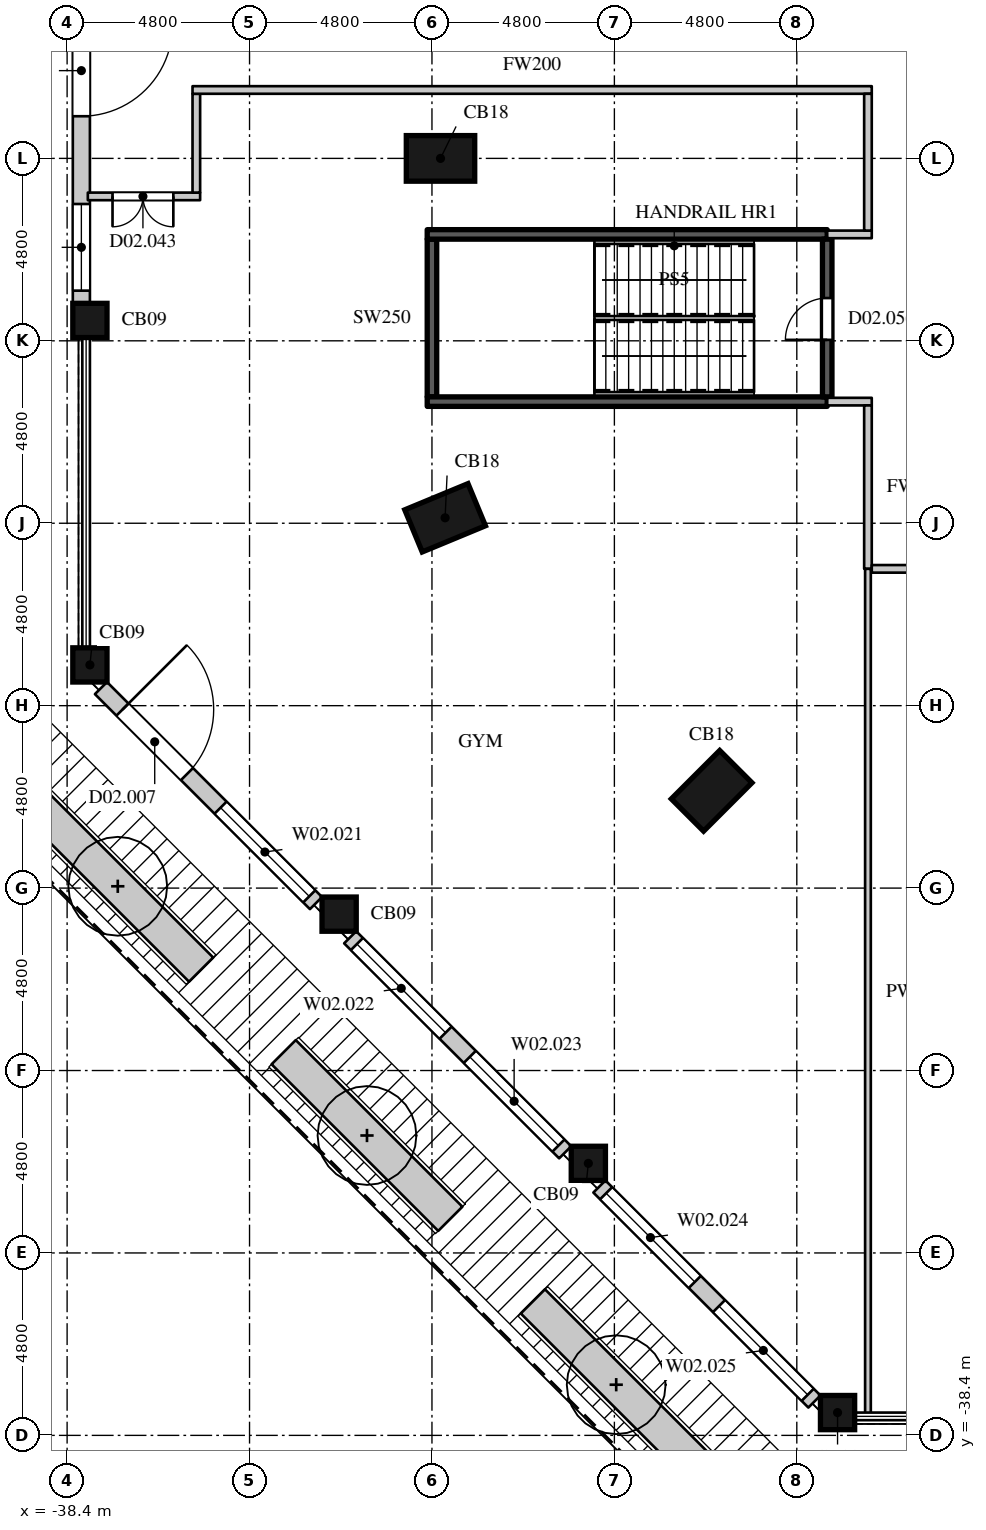
"""IFC4 building model, lengths in metres.
Left out: names, types, materials, properties, quantities, classifications, styles, units other than length and angle.
Written with IfcOpenShell. Run it as: python <this file> out.ifc"""

import sys

from ifc_helpers import new_model, si_unit, direction, frame, frame_2d, origin, origin_2d, place, context, subcontext, project, spatial, rectangle, extrude, element, fill, save


model = new_model("IFC4")
c1 = context("Model", 3, precision=1e-05, world=origin(), true_north=direction((0.0, 1.0)))
c2 = subcontext(c1, "Body", "Model", "MODEL_VIEW")
j1 = project(units=[si_unit("LENGTHUNIT", "METRE"), si_unit("PLANEANGLEUNIT", "RADIAN")], contexts=[c1])
p1 = place(None, origin())
s1 = spatial("IfcSite", under=j1, at=p1, CompositionType="ELEMENT")
p2 = place(p1, origin())
s2 = spatial("IfcBuilding", under=s1, at=p2, CompositionType="ELEMENT")
p3 = place(p2, frame((0.0, 0.0, 11.0)))
s3 = spatial("IfcBuildingStorey", under=s2, at=p3, CompositionType="ELEMENT", Elevation=11.0)
for number, where, z_axis, x_axis in (
    (1, (-18.128, -37.8, 0.0), (0.0, 0.0, 1.0), (1.0, 0.0, 0.0)),
    (2, (-24.685, -31.243, 0.0), (0.0, 0.0, 1.0), (1.0, 0.0, 0.0)),
    (3, (-31.243, -24.685, 0.0), (0.0, 0.0, 1.0), (1.0, 0.0, 0.0)),
):
    element("IfcColumn", number, at=place(p3, frame(where, z_axis=z_axis, x_axis=x_axis)), inside=s3, PredefinedType="COLUMN", context=c2, shape_type="SweptSolid", body=[
        extrude(rectangle(XDim=0.9, YDim=0.9, at=origin_2d()), origin(), (0.0, 0.0, 1.0), 5.0),
    ])
p4 = place(p3, frame((-21.441, -21.441, 0.0), z_axis=(0.0, 0.0, 1.0), x_axis=(0.707106781187, -0.707106781187, 0.0)))
e4 = element("IfcColumn", 4, at=p4, inside=s3, PredefinedType="COLUMN", context=c2, shape_type="SweptSolid", body=[
    extrude(rectangle(XDim=1.2, YDim=1.8, at=origin_2d()), origin(), (0.0, 0.0, 1.0), 5.0),
])
p5 = place(p3, frame((-37.8, -18.128, 0.0), z_axis=(0.0, 0.0, 1.0), x_axis=(1.0, 0.0, 0.0)))
e5 = element("IfcColumn", 5, at=p5, inside=s3, PredefinedType="COLUMN", context=c2, shape_type="SweptSolid", body=[
    extrude(rectangle(XDim=0.9, YDim=0.9, at=origin_2d()), origin(), (0.0, 0.0, 1.0), 5.0),
])
p6 = place(p3, frame((-28.454, -14.257, 0.0), z_axis=(0.0, 0.0, 1.0), x_axis=(0.382683496864, -0.923879505795, 0.0)))
e6 = element("IfcColumn", 6, at=p6, inside=s3, PredefinedType="COLUMN", context=c2, shape_type="SweptSolid", body=[
    extrude(rectangle(XDim=1.2, YDim=1.8, at=origin_2d()), origin(), (0.0, 0.0, 1.0), 5.0),
])
p7 = place(p3, frame((-37.8, -9.064, 0.0), z_axis=(0.0, 0.0, 1.0), x_axis=(1.0, 0.0, 0.0)))
e7 = element("IfcColumn", 7, at=p7, inside=s3, PredefinedType="COLUMN", context=c2, shape_type="SweptSolid", body=[
    extrude(rectangle(XDim=0.9, YDim=0.9, at=origin_2d()), origin(), (0.0, 0.0, 1.0), 5.0),
])
p8 = place(p3, frame((-28.575, -4.8, 0.0), z_axis=(0.0, 0.0, 1.0), x_axis=(0.0, -1.0, 0.0)))
e8 = element("IfcColumn", 8, at=p8, inside=s3, PredefinedType="COLUMN", context=c2, shape_type="SweptSolid", body=[
    extrude(rectangle(XDim=1.2, YDim=1.8, at=origin_2d()), origin(), (0.0, 0.0, 1.0), 5.0),
])
p9 = place(p3, frame((-38.025, -0.45, 0.0), z_axis=(0.0, 0.0, 1.0), x_axis=(0.0, -1.0, 0.0)))
e9 = element("IfcWall", 9, at=p9, inside=s3, PredefinedType="ELEMENTEDWALL", context=c2, shape_type="SweptSolid", body=[
    extrude(rectangle(XDim=8.164, YDim=0.45, at=frame_2d((4.082, 0.0))), origin(), (0.0, 0.0, 1.0), 3.8),
])
p10 = place(p9, frame((0.841, 0.0, 0.0)))
e10 = element("IfcOpeningElement", 10, at=p10, cuts=e9, PredefinedType="OPENING", context=c2, shape_type="SweptSolid", body=[
    extrude(rectangle(XDim=2.4, YDim=2.7, at=frame_2d((1.2, 1.35))), frame((0.0, 0.235, 0.0), z_axis=(0.0, -1.0, 0.0), x_axis=(1.0, 0.0, 0.0)), (0.0, 0.0, 1.0), 0.47),
])
p11 = place(p9, frame((5.55, 0.0, 1.05)))
e11 = element("IfcOpeningElement", 11, at=p11, cuts=e9, PredefinedType="OPENING", context=c2, shape_type="SweptSolid", body=[
    extrude(rectangle(XDim=2.28, YDim=2.7, at=frame_2d((1.14, 1.35))), frame((0.0, 0.235, 0.0), z_axis=(0.0, -1.0, 0.0), x_axis=(1.0, 0.0, 0.0)), (0.0, 0.0, 1.0), 0.47),
])
p12 = place(p3, frame((-37.509, -18.737, 0.0), z_axis=(0.0, 0.0, 1.0), x_axis=(0.707106781187, -0.707106781187, 0.0)))
e12 = element("IfcWall", 12, at=p12, inside=s3, PredefinedType="ELEMENTEDWALL", context=c2, shape_type="SweptSolid", body=[
    extrude(rectangle(XDim=8.0, YDim=0.45, at=frame_2d((4.0, 0.0))), origin(), (0.0, 0.0, 1.0), 3.8),
])
p13 = place(p12, frame((0.8, 0.0, 0.0)))
e13 = element("IfcOpeningElement", 13, at=p13, cuts=e12, PredefinedType="OPENING", context=c2, shape_type="SweptSolid", body=[
    extrude(rectangle(XDim=2.4, YDim=2.7, at=frame_2d((1.2, 1.35))), frame((0.0, 0.235, 0.0), z_axis=(0.0, -1.0, 0.0), x_axis=(1.0, 0.0, 0.0)), (0.0, 0.0, 1.0), 0.47),
])
p14 = place(p12, frame((4.45, 0.0, 1.05)))
e14 = element("IfcOpeningElement", 14, at=p14, cuts=e12, PredefinedType="OPENING", context=c2, shape_type="SweptSolid", body=[
    extrude(rectangle(XDim=3.3, YDim=2.7, at=frame_2d((1.65, 1.35))), frame((0.0, 0.235, 0.0), z_axis=(0.0, -1.0, 0.0), x_axis=(1.0, 0.0, 0.0)), (0.0, 0.0, 1.0), 0.47),
])
p15 = place(p3, frame((-30.952, -25.294, 0.0), z_axis=(0.0, 0.0, 1.0), x_axis=(0.707106781187, -0.707106781187, 0.0)))
e15 = element("IfcWall", 15, at=p15, inside=s3, PredefinedType="ELEMENTEDWALL", context=c2, shape_type="SweptSolid", body=[
    extrude(rectangle(XDim=8.0, YDim=0.45, at=frame_2d((4.0, 0.0))), origin(), (0.0, 0.0, 1.0), 3.8),
])
p16 = place(p15, frame((0.25, 0.0, 1.05)))
e16 = element("IfcOpeningElement", 16, at=p16, cuts=e15, PredefinedType="OPENING", context=c2, shape_type="SweptSolid", body=[
    extrude(rectangle(XDim=3.3, YDim=2.7, at=frame_2d((1.65, 1.35))), frame((0.0, 0.235, 0.0), z_axis=(0.0, -1.0, 0.0), x_axis=(1.0, 0.0, 0.0)), (0.0, 0.0, 1.0), 0.47),
])
p17 = place(p15, frame((4.45, 0.0, 1.05)))
e17 = element("IfcOpeningElement", 17, at=p17, cuts=e15, PredefinedType="OPENING", context=c2, shape_type="SweptSolid", body=[
    extrude(rectangle(XDim=3.3, YDim=2.7, at=frame_2d((1.65, 1.35))), frame((0.0, 0.235, 0.0), z_axis=(0.0, -1.0, 0.0), x_axis=(1.0, 0.0, 0.0)), (0.0, 0.0, 1.0), 0.47),
])
p18 = place(p3, frame((-24.394, -31.852, 0.0), z_axis=(0.0, 0.0, 1.0), x_axis=(0.707106781187, -0.707106781187, 0.0)))
e18 = element("IfcWall", 18, at=p18, inside=s3, PredefinedType="ELEMENTEDWALL", context=c2, shape_type="SweptSolid", body=[
    extrude(rectangle(XDim=8.0, YDim=0.45, at=frame_2d((4.0, 0.0))), origin(), (0.0, 0.0, 1.0), 3.8),
])
p19 = place(p18, frame((0.25, 0.0, 1.05)))
e19 = element("IfcOpeningElement", 19, at=p19, cuts=e18, PredefinedType="OPENING", context=c2, shape_type="SweptSolid", body=[
    extrude(rectangle(XDim=3.3, YDim=2.7, at=frame_2d((1.65, 1.35))), frame((0.0, 0.235, 0.0), z_axis=(0.0, -1.0, 0.0), x_axis=(1.0, 0.0, 0.0)), (0.0, 0.0, 1.0), 0.47),
])
p20 = place(p18, frame((4.45, 0.0, 1.05)))
e20 = element("IfcOpeningElement", 20, at=p20, cuts=e18, PredefinedType="OPENING", context=c2, shape_type="SweptSolid", body=[
    extrude(rectangle(XDim=3.3, YDim=2.7, at=frame_2d((1.65, 1.35))), frame((0.0, 0.235, 0.0), z_axis=(0.0, -1.0, 0.0), x_axis=(1.0, 0.0, 0.0)), (0.0, 0.0, 1.0), 0.47),
])
p21 = place(p3, frame((-39.259, -21.76, 0.0), z_axis=(0.0, 0.0, 1.0), x_axis=(0.707126467061, -0.707087094764, 0.0)))
e21 = element("IfcWall", 21, at=p21, inside=s3, PredefinedType="USERDEFINED", context=c2, shape_type="SweptSolid", body=[
    extrude(rectangle(XDim=6.201, YDim=0.9, at=frame_2d((3.101, 0.0))), origin(), (0.0, 0.0, 1.0), 0.9),
])
p22 = place(p3, frame((-32.702, -28.317, 0.0), z_axis=(0.0, 0.0, 1.0), x_axis=(0.707106781187, -0.707106781187, 0.0)))
e22 = element("IfcWall", 22, at=p22, inside=s3, PredefinedType="USERDEFINED", context=c2, shape_type="SweptSolid", body=[
    extrude(rectangle(XDim=6.201, YDim=0.9, at=frame_2d((3.1, 0.0))), origin(), (0.0, 0.0, 1.0), 0.9),
])
p23 = place(p3, frame((-26.145, -34.875, 0.0), z_axis=(0.0, 0.0, 1.0), x_axis=(0.707087094764, -0.707126467061, 0.0)))
e23 = element("IfcWall", 23, at=p23, inside=s3, PredefinedType="USERDEFINED", context=c2, shape_type="SweptSolid", body=[
    extrude(rectangle(XDim=6.201, YDim=0.9, at=frame_2d((3.101, 0.0))), origin(), (0.0, 0.0, 1.0), 0.9),
])
p24 = place(p3, frame((-37.855, -5.8, 0.0), z_axis=(0.0, 0.0, 1.0), x_axis=(1.0, 0.0, 0.0)))
e24 = element("IfcWall", 24, at=p24, inside=s3, PredefinedType="PARTITIONING", context=c2, shape_type="SweptSolid", body=[
    extrude(rectangle(XDim=2.955, YDim=0.2, at=frame_2d((1.478, 0.0))), origin(), (0.0, 0.0, 1.0), 4.65),
])
p25 = place(p24, frame((0.65, 0.0, 0.0)))
e25 = element("IfcOpeningElement", 25, at=p25, cuts=e24, PredefinedType="OPENING", context=c2, shape_type="SweptSolid", body=[
    extrude(rectangle(XDim=1.6, YDim=2.4, at=frame_2d((0.8, 1.2))), frame((0.0, 0.11, 0.0), z_axis=(0.0, -1.0, 0.0), x_axis=(1.0, 0.0, 0.0)), (0.0, 0.0, 1.0), 0.22),
])
p26 = place(p3, frame((-35.0, -5.7, 0.0), z_axis=(0.0, 0.0, 1.0), x_axis=(0.0, 1.0, 0.0)))
e26 = element("IfcWall", 26, at=p26, inside=s3, PredefinedType="PARTITIONING", context=c2, shape_type="SweptSolid", body=[
    extrude(rectangle(XDim=2.6, YDim=0.2, at=frame_2d((1.3, 0.0))), origin(), (0.0, 0.0, 1.0), 4.65),
])
p27 = place(p3, frame((-35.1, -3.0, 0.0), z_axis=(0.0, 0.0, 1.0), x_axis=(1.0, 0.0, 0.0)))
e27 = element("IfcWall", 27, at=p27, inside=s3, PredefinedType="PARTITIONING", context=c2, shape_type="SweptSolid", body=[
    extrude(rectangle(XDim=17.872, YDim=0.2, at=frame_2d((8.936, 0.0))), origin(), (0.0, 0.0, 1.0), 4.65),
])
for number, where, z_axis, x_axis in (
    (28, (-18.4, -11.2, 0.0), (0.0, 0.0, 1.0), (1.0, 0.0, 0.0)),
    (29, (-18.4, -6.8, 0.0), (0.0, 0.0, 1.0), (1.0, 0.0, 0.0)),
):
    element("IfcWall", number, at=place(p3, frame(where, z_axis=z_axis, x_axis=x_axis)), inside=s3, PredefinedType="PARTITIONING", context=c2, shape_type="SweptSolid", body=[
        extrude(rectangle(XDim=1.172, YDim=0.2, at=frame_2d((0.586, 0.0))), origin(), (0.0, 0.0, 1.0), 4.65),
    ])
p28 = place(p3, frame((-17.328, -15.6, 0.0), z_axis=(0.0, 0.0, 1.0), x_axis=(0.0, 1.0, 0.0)))
e30 = element("IfcWall", 30, at=p28, inside=s3, PredefinedType="PARTITIONING", context=c2, shape_type="SweptSolid", body=[
    extrude(rectangle(XDim=4.3, YDim=0.2, at=frame_2d((2.15, 0.0))), origin(), (0.0, 0.0, 1.0), 4.65),
])
p29 = place(p3, frame((-17.228, -15.6, 0.0), z_axis=(0.0, 0.0, 1.0), x_axis=(1.0, 0.0, 0.0)))
e31 = element("IfcWall", 31, at=p29, inside=s3, PredefinedType="PARTITIONING", context=c2, shape_type="SweptSolid", body=[
    extrude(rectangle(XDim=6.128, YDim=0.2, at=frame_2d((3.064, 0.0))), origin(), (0.0, 0.0, 1.0), 4.65),
])
p30 = place(p29, frame((2.25, 0.0, 0.0)))
e32 = element("IfcOpeningElement", 32, at=p30, cuts=e31, PredefinedType="OPENING", context=c2, shape_type="SweptSolid", body=[
    extrude(rectangle(XDim=1.6, YDim=2.4, at=frame_2d((0.8, 1.2))), frame((0.0, 0.11, 0.0), z_axis=(0.0, -1.0, 0.0), x_axis=(1.0, 0.0, 0.0)), (0.0, 0.0, 1.0), 0.22),
])
p31 = place(p3, frame((-17.328, -6.7, 0.0), z_axis=(0.0, 0.0, 1.0), x_axis=(0.0, 1.0, 0.0)))
e33 = element("IfcWall", 33, at=p31, inside=s3, PredefinedType="PARTITIONING", context=c2, shape_type="SweptSolid", body=[
    extrude(rectangle(XDim=3.6, YDim=0.2, at=frame_2d((1.8, 0.0))), origin(), (0.0, 0.0, 1.0), 4.65),
])
p32 = place(p3, frame((-17.328, -37.855, 0.0), z_axis=(0.0, 0.0, 1.0), x_axis=(0.0, 1.0, 0.0)))
e34 = element("IfcWall", 34, at=p32, inside=s3, PredefinedType="PARTITIONING", context=c2, shape_type="SweptSolid", body=[
    extrude(rectangle(XDim=22.255, YDim=0.15, at=frame_2d((11.127, 0.0))), origin(), (0.0, 0.0, 1.0), 4.65),
])
p33 = place(p3, frame((-28.8, -11.075, 0.0), z_axis=(0.0, 0.0, 1.0), x_axis=(0.0, 1.0, 0.0)))
e35 = element("IfcWall", 35, at=p33, inside=s3, PredefinedType="SHEAR", context=c2, shape_type="SweptSolid", body=[
    extrude(rectangle(XDim=4.15, YDim=0.25, at=frame_2d((2.075, 0.0))), origin(), (0.0, 0.0, 1.0), 4.65),
])
for number, where, z_axis, x_axis in (
    (36, (-28.925, -11.2, 0.0), (0.0, 0.0, 1.0), (1.0, 0.0, 0.0)),
    (37, (-28.925, -6.8, 0.0), (0.0, 0.0, 1.0), (1.0, 0.0, 0.0)),
):
    element("IfcWall", number, at=place(p3, frame(where, z_axis=z_axis, x_axis=x_axis)), inside=s3, PredefinedType="SHEAR", context=c2, shape_type="SweptSolid", body=[
        extrude(rectangle(XDim=10.525, YDim=0.25, at=frame_2d((5.263, 0.0))), origin(), (0.0, 0.0, 1.0), 4.65),
    ])
p34 = place(p3, frame((-18.4, -11.075, 0.0), z_axis=(0.0, 0.0, 1.0), x_axis=(0.0, 1.0, 0.0)))
e38 = element("IfcWall", 38, at=p34, inside=s3, PredefinedType="SHEAR", context=c2, shape_type="SweptSolid", body=[
    extrude(rectangle(XDim=4.15, YDim=0.25, at=frame_2d((2.075, 0.0))), origin(), (0.0, 0.0, 1.0), 4.65),
])
p35 = place(p34, frame((1.5, 0.0, 0.0)))
e39 = element("IfcOpeningElement", 39, at=p35, cuts=e38, PredefinedType="OPENING", context=c2, shape_type="SweptSolid", body=[
    extrude(rectangle(XDim=1.1, YDim=2.2, at=frame_2d((0.55, 1.1))), frame((0.0, 0.135, 0.0), z_axis=(0.0, -1.0, 0.0), x_axis=(1.0, 0.0, 0.0)), (0.0, 0.0, 1.0), 0.27),
])
p36 = place(p10, origin())
e40 = element("IfcDoor", 40, at=p36, inside=s3, OperationType="SINGLE_SWING_LEFT", PredefinedType="DOOR", context=c2, shape_type="SweptSolid", body=[
    extrude(rectangle(XDim=2.4, YDim=2.7, at=frame_2d((1.2, 1.35))), frame((0.0, 0.13, 0.0), z_axis=(0.0, -1.0, 0.0), x_axis=(1.0, 0.0, 0.0)), (0.0, 0.0, 1.0), 0.05),
])
fill(e10, e40)
p37 = place(p11, origin())
e41 = element("IfcWindow", 41, at=p37, inside=s3, PartitioningType="SINGLE_PANEL", PredefinedType="WINDOW", context=c2, shape_type="SweptSolid", body=[
    extrude(rectangle(XDim=2.28, YDim=2.7, at=frame_2d((1.14, 1.35))), frame((0.0, 0.135, 0.0), z_axis=(0.0, -1.0, 0.0), x_axis=(1.0, 0.0, 0.0)), (0.0, 0.0, 1.0), 0.06),
])
fill(e11, e41)
p38 = place(p13, origin())
e42 = element("IfcDoor", 42, at=p38, inside=s3, OperationType="SINGLE_SWING_LEFT", PredefinedType="DOOR", context=c2, shape_type="SweptSolid", body=[
    extrude(rectangle(XDim=2.4, YDim=2.7, at=frame_2d((1.2, 1.35))), frame((0.0, 0.13, 0.0), z_axis=(0.0, -1.0, 0.0), x_axis=(1.0, 0.0, 0.0)), (0.0, 0.0, 1.0), 0.05),
])
fill(e13, e42)
p39 = place(p14, origin())
e43 = element("IfcWindow", 43, at=p39, inside=s3, PartitioningType="SINGLE_PANEL", PredefinedType="WINDOW", context=c2, shape_type="SweptSolid", body=[
    extrude(rectangle(XDim=3.3, YDim=2.7, at=frame_2d((1.65, 1.35))), frame((0.0, 0.135, 0.0), z_axis=(0.0, -1.0, 0.0), x_axis=(1.0, 0.0, 0.0)), (0.0, 0.0, 1.0), 0.06),
])
fill(e14, e43)
p40 = place(p16, origin())
e44 = element("IfcWindow", 44, at=p40, inside=s3, PartitioningType="SINGLE_PANEL", PredefinedType="WINDOW", context=c2, shape_type="SweptSolid", body=[
    extrude(rectangle(XDim=3.3, YDim=2.7, at=frame_2d((1.65, 1.35))), frame((0.0, 0.135, 0.0), z_axis=(0.0, -1.0, 0.0), x_axis=(1.0, 0.0, 0.0)), (0.0, 0.0, 1.0), 0.06),
])
fill(e16, e44)
p41 = place(p17, origin())
e45 = element("IfcWindow", 45, at=p41, inside=s3, PartitioningType="SINGLE_PANEL", PredefinedType="WINDOW", context=c2, shape_type="SweptSolid", body=[
    extrude(rectangle(XDim=3.3, YDim=2.7, at=frame_2d((1.65, 1.35))), frame((0.0, 0.135, 0.0), z_axis=(0.0, -1.0, 0.0), x_axis=(1.0, 0.0, 0.0)), (0.0, 0.0, 1.0), 0.06),
])
fill(e17, e45)
p42 = place(p19, origin())
e46 = element("IfcWindow", 46, at=p42, inside=s3, PartitioningType="SINGLE_PANEL", PredefinedType="WINDOW", context=c2, shape_type="SweptSolid", body=[
    extrude(rectangle(XDim=3.3, YDim=2.7, at=frame_2d((1.65, 1.35))), frame((0.0, 0.135, 0.0), z_axis=(0.0, -1.0, 0.0), x_axis=(1.0, 0.0, 0.0)), (0.0, 0.0, 1.0), 0.06),
])
fill(e19, e46)
p43 = place(p20, origin())
e47 = element("IfcWindow", 47, at=p43, inside=s3, PartitioningType="SINGLE_PANEL", PredefinedType="WINDOW", context=c2, shape_type="SweptSolid", body=[
    extrude(rectangle(XDim=3.3, YDim=2.7, at=frame_2d((1.65, 1.35))), frame((0.0, 0.135, 0.0), z_axis=(0.0, -1.0, 0.0), x_axis=(1.0, 0.0, 0.0)), (0.0, 0.0, 1.0), 0.06),
])
fill(e20, e47)
p44 = place(p25, origin())
e48 = element("IfcDoor", 48, at=p44, inside=s3, OperationType="DOUBLE_DOOR_SINGLE_SWING", PredefinedType="DOOR", context=c2, shape_type="SweptSolid", body=[
    extrude(rectangle(XDim=1.6, YDim=2.4, at=frame_2d((0.8, 1.2))), frame((0.0, 0.025, 0.0), z_axis=(0.0, -1.0, 0.0), x_axis=(1.0, 0.0, 0.0)), (0.0, 0.0, 1.0), 0.05),
])
fill(e25, e48)
p45 = place(p35, origin())
e49 = element("IfcDoor", 49, at=p45, inside=s3, OperationType="SINGLE_SWING_LEFT", PredefinedType="DOOR", context=c2, shape_type="SweptSolid", body=[
    extrude(rectangle(XDim=1.1, YDim=2.2, at=frame_2d((0.55, 1.1))), frame((0.0, 0.025, 0.0), z_axis=(0.0, -1.0, 0.0), x_axis=(1.0, 0.0, 0.0)), (0.0, 0.0, 1.0), 0.05),
])
fill(e39, e49)
save(model, sys.argv[1])
